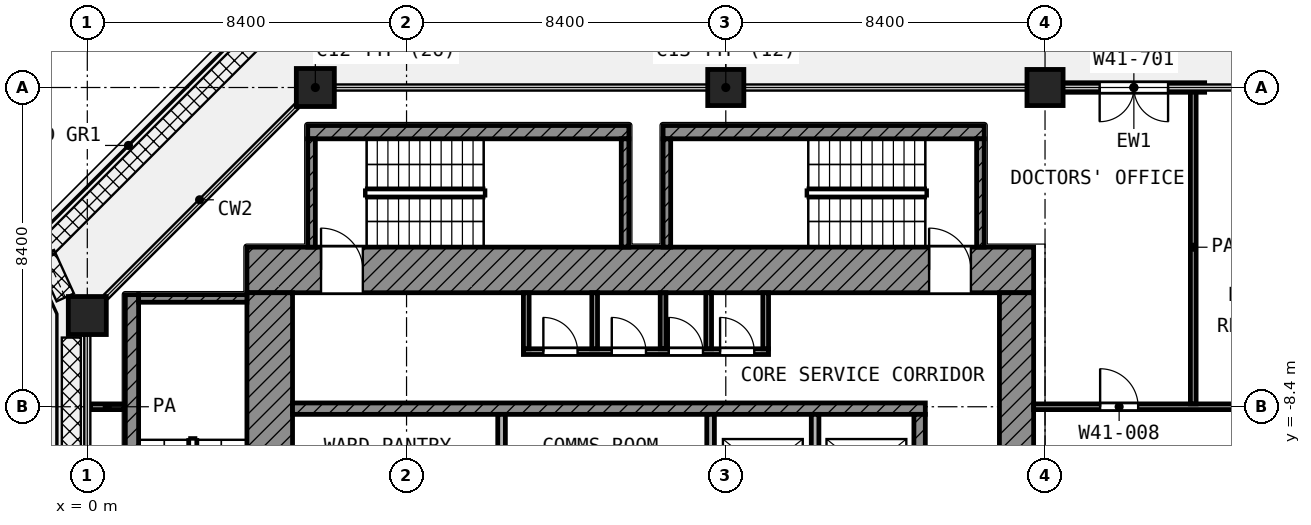
"""IFC4 building model, lengths in metres.
Left out: names, types, materials, properties, quantities, classifications, styles, units other than length and angle.
Written with IfcOpenShell. Run it as: python <this file> out.ifc"""

import sys

from ifc_helpers import new_model, si_unit, direction, frame, frame_2d, origin, origin_2d, place, context, subcontext, project, spatial, rectangle, extrude, element, fill, save


model = new_model("IFC4")
c1 = context("Model", 3, precision=1e-05, world=origin(), true_north=direction((0.0, 1.0)))
c2 = subcontext(c1, "Body", "Model", "MODEL_VIEW")
j1 = project(units=[si_unit("LENGTHUNIT", "METRE"), si_unit("PLANEANGLEUNIT", "RADIAN")], contexts=[c1])
p1 = place(None, origin())
s1 = spatial("IfcSite", under=j1, at=p1, CompositionType="ELEMENT")
p2 = place(p1, origin())
s2 = spatial("IfcBuilding", under=s1, at=p2, CompositionType="ELEMENT")
p3 = place(p2, frame((0.0, 0.0, 200.4)))
s3 = spatial("IfcBuildingStorey", under=s2, at=p3, CompositionType="ELEMENT", Elevation=200.4)
p4 = place(p3, frame((6.0, 0.0, 0.0), z_axis=(0.0, 0.0, 1.0), x_axis=(1.0, 0.0, 0.0)))
e1 = element("IfcColumn", 1, at=p4, inside=s3, PredefinedType="COLUMN", context=c2, shape_type="SweptSolid", body=[
    extrude(rectangle(XDim=1.0, YDim=1.0, at=origin_2d()), origin(), (0.0, 0.0, 1.0), 4.2),
])
for number, where, z_axis, x_axis in (
    (2, (16.8, 0.0, 0.0), (0.0, 0.0, 1.0), (1.0, 0.0, 0.0)),
    (3, (25.2, 0.0, 0.0), (0.0, 0.0, 1.0), (1.0, 0.0, 0.0)),
):
    element("IfcColumn", number, at=place(p3, frame(where, z_axis=z_axis, x_axis=x_axis)), inside=s3, PredefinedType="COLUMN", context=c2, shape_type="SweptSolid", body=[
        extrude(rectangle(XDim=0.95, YDim=0.95, at=origin_2d()), origin(), (0.0, 0.0, 1.0), 4.2),
    ])
p5 = place(p3, frame((0.0, -6.0, 0.0), z_axis=(0.0, 0.0, 1.0), x_axis=(1.0, 0.0, 0.0)))
e4 = element("IfcColumn", 4, at=p5, inside=s3, PredefinedType="COLUMN", context=c2, shape_type="SweptSolid", body=[
    extrude(rectangle(XDim=1.0, YDim=1.0, at=origin_2d()), origin(), (0.0, 0.0, 1.0), 4.2),
])
p6 = place(p3, frame((29.4, 0.0, 0.0), z_axis=(0.0, 0.0, 1.0), x_axis=(-1.0, 0.0, 0.0)))
e5 = element("IfcWall", 5, at=p6, inside=s3, PredefinedType="SOLIDWALL", context=c2, shape_type="SweptSolid", body=[
    extrude(rectangle(XDim=3.725, YDim=0.25, at=frame_2d((1.862, 0.0))), origin(), (0.0, 0.0, 1.0), 2.58),
])
p7 = place(p6, frame((0.962, 0.0, 0.0)))
e6 = element("IfcOpeningElement", 6, at=p7, cuts=e5, PredefinedType="OPENING", context=c2, shape_type="SweptSolid", body=[
    extrude(rectangle(XDim=1.8, YDim=2.1, at=frame_2d((0.9, 1.05))), frame((0.0, 0.135, 0.0), z_axis=(0.0, -1.0, 0.0), x_axis=(1.0, 0.0, 0.0)), (0.0, 0.0, 1.0), 0.27),
])
p8 = place(p3, frame((4.2, -4.8, 0.0), z_axis=(0.0, 0.0, 1.0), x_axis=(1.0, 0.0, 0.0)))
e7 = element("IfcWall", 7, at=p8, inside=s3, PredefinedType="SHEAR", context=c2, shape_type="SweptSolid", body=[
    extrude(rectangle(XDim=20.7, YDim=1.2, at=frame_2d((10.35, 0.0))), origin(), (0.0, 0.0, 1.0), 3.6),
])
p9 = place(p8, frame((1.95, 0.0, 0.0)))
e8 = element("IfcOpeningElement", 8, at=p9, cuts=e7, PredefinedType="OPENING", context=c2, shape_type="SweptSolid", body=[
    extrude(rectangle(XDim=1.1, YDim=2.1, at=frame_2d((0.55, 1.05))), frame((0.0, 0.61, 0.0), z_axis=(0.0, -1.0, 0.0), x_axis=(1.0, 0.0, 0.0)), (0.0, 0.0, 1.0), 1.22),
])
p10 = place(p8, frame((17.95, 0.0, 0.0)))
e9 = element("IfcOpeningElement", 9, at=p10, cuts=e7, PredefinedType="OPENING", context=c2, shape_type="SweptSolid", body=[
    extrude(rectangle(XDim=1.1, YDim=2.1, at=frame_2d((0.55, 1.05))), frame((0.0, 0.61, 0.0), z_axis=(0.0, -1.0, 0.0), x_axis=(1.0, 0.0, 0.0)), (0.0, 0.0, 1.0), 1.22),
])
p11 = place(p3, frame((4.8, -24.9, 0.0), z_axis=(0.0, 0.0, 1.0), x_axis=(0.0, 1.0, 0.0)))
e10 = element("IfcWall", 10, at=p11, inside=s3, PredefinedType="SHEAR", context=c2, shape_type="SweptSolid", body=[
    extrude(rectangle(XDim=19.5, YDim=1.2, at=frame_2d((9.75, 0.0))), origin(), (0.0, 0.0, 1.0), 3.6),
])
p12 = place(p11, frame((11.35, 0.0, 0.0)))
e11 = element("IfcOpeningElement", 11, at=p12, cuts=e10, PredefinedType="OPENING", context=c2, shape_type="SweptSolid", body=[
    extrude(rectangle(XDim=1.1, YDim=2.1, at=frame_2d((0.55, 1.05))), frame((0.0, 0.61, 0.0), z_axis=(0.0, -1.0, 0.0), x_axis=(1.0, 0.0, 0.0)), (0.0, 0.0, 1.0), 1.22),
])
p13 = place(p11, frame((2.05, 0.0, 0.0)))
e12 = element("IfcOpeningElement", 12, at=p13, cuts=e10, PredefinedType="OPENING", context=c2, shape_type="SweptSolid", body=[
    extrude(rectangle(XDim=1.1, YDim=2.1, at=frame_2d((0.55, 1.05))), frame((0.0, 0.61, 0.0), z_axis=(0.0, -1.0, 0.0), x_axis=(1.0, 0.0, 0.0)), (0.0, 0.0, 1.0), 1.22),
])
p14 = place(p3, frame((24.45, -24.0, 0.0), z_axis=(0.0, 0.0, 1.0), x_axis=(0.0, 1.0, 0.0)))
e13 = element("IfcWall", 13, at=p14, inside=s3, PredefinedType="SHEAR", context=c2, shape_type="SweptSolid", body=[
    extrude(rectangle(XDim=18.6, YDim=0.9, at=frame_2d((9.3, 0.0))), origin(), (0.0, 0.0, 1.0), 3.6),
])
p15 = place(p14, frame((10.5, 0.0, 0.0)))
e14 = element("IfcOpeningElement", 14, at=p15, cuts=e13, PredefinedType="OPENING", context=c2, shape_type="SweptSolid", body=[
    extrude(rectangle(XDim=1.8, YDim=2.1, at=frame_2d((0.9, 1.05))), frame((0.0, 0.46, 0.0), z_axis=(0.0, -1.0, 0.0), x_axis=(1.0, 0.0, 0.0)), (0.0, 0.0, 1.0), 0.92),
])
p16 = place(p3, frame((5.4, -8.45, 0.0), z_axis=(0.0, 0.0, 1.0), x_axis=(1.0, 0.0, 0.0)))
e15 = element("IfcWall", 15, at=p16, inside=s3, PredefinedType="SHEAR", context=c2, shape_type="SweptSolid", body=[
    extrude(rectangle(XDim=16.65, YDim=0.3, at=frame_2d((8.325, 0.0))), origin(), (0.0, 0.0, 1.0), 3.6),
])
p17 = place(p3, frame((21.9, -10.95, 0.0), z_axis=(0.0, 0.0, 1.0), x_axis=(0.0, 1.0, 0.0)))
e16 = element("IfcWall", 16, at=p17, inside=s3, PredefinedType="SHEAR", context=c2, shape_type="SweptSolid", body=[
    extrude(rectangle(XDim=2.35, YDim=0.3, at=frame_2d((1.175, 0.0))), origin(), (0.0, 0.0, 1.0), 3.6),
])
for number, where, z_axis, x_axis in (
    (17, (10.9, -10.95, 0.0), (0.0, 0.0, 1.0), (0.0, 1.0, 0.0)),
    (18, (16.4, -10.95, 0.0), (0.0, 0.0, 1.0), (0.0, 1.0, 0.0)),
    (19, (19.15, -10.95, 0.0), (0.0, 0.0, 1.0), (0.0, 1.0, 0.0)),
):
    element("IfcWall", number, at=place(p3, frame(where, z_axis=z_axis, x_axis=x_axis)), inside=s3, PredefinedType="PARTITIONING", context=c2, shape_type="SweptSolid", body=[
        extrude(rectangle(XDim=2.35, YDim=0.2, at=frame_2d((1.175, 0.0))), origin(), (0.0, 0.0, 1.0), 3.6),
    ])
p18 = place(p3, frame((11.475, -6.95, 0.0), z_axis=(0.0, 0.0, 1.0), x_axis=(1.0, 0.0, 0.0)))
e20 = element("IfcWall", 20, at=p18, inside=s3, PredefinedType="PARTITIONING", context=c2, shape_type="SweptSolid", body=[
    extrude(rectangle(XDim=6.45, YDim=0.15, at=frame_2d((3.225, 0.0))), origin(), (0.0, 0.0, 1.0), 3.6),
])
p19 = place(p18, frame((0.525, 0.0, 0.0)))
e21 = element("IfcOpeningElement", 21, at=p19, cuts=e20, PredefinedType="OPENING", context=c2, shape_type="SweptSolid", body=[
    extrude(rectangle(XDim=0.9, YDim=2.1, at=frame_2d((0.45, 1.05))), frame((0.0, 0.085, 0.0), z_axis=(0.0, -1.0, 0.0), x_axis=(1.0, 0.0, 0.0)), (0.0, 0.0, 1.0), 0.17),
])
p20 = place(p18, frame((2.325, 0.0, 0.0)))
e22 = element("IfcOpeningElement", 22, at=p20, cuts=e20, PredefinedType="OPENING", context=c2, shape_type="SweptSolid", body=[
    extrude(rectangle(XDim=0.9, YDim=2.1, at=frame_2d((0.45, 1.05))), frame((0.0, 0.085, 0.0), z_axis=(0.0, -1.0, 0.0), x_axis=(1.0, 0.0, 0.0)), (0.0, 0.0, 1.0), 0.17),
])
p21 = place(p18, frame((3.825, 0.0, 0.0)))
e23 = element("IfcOpeningElement", 23, at=p21, cuts=e20, PredefinedType="OPENING", context=c2, shape_type="SweptSolid", body=[
    extrude(rectangle(XDim=0.9, YDim=2.1, at=frame_2d((0.45, 1.05))), frame((0.0, 0.085, 0.0), z_axis=(0.0, -1.0, 0.0), x_axis=(1.0, 0.0, 0.0)), (0.0, 0.0, 1.0), 0.17),
])
p22 = place(p18, frame((5.175, 0.0, 0.0)))
e24 = element("IfcOpeningElement", 24, at=p22, cuts=e20, PredefinedType="OPENING", context=c2, shape_type="SweptSolid", body=[
    extrude(rectangle(XDim=0.9, YDim=2.1, at=frame_2d((0.45, 1.05))), frame((0.0, 0.085, 0.0), z_axis=(0.0, -1.0, 0.0), x_axis=(1.0, 0.0, 0.0)), (0.0, 0.0, 1.0), 0.17),
])
for number, where, z_axis, x_axis in (
    (25, (11.55, -6.875, 0.0), (0.0, 0.0, 1.0), (0.0, 1.0, 0.0)),
    (26, (13.35, -6.875, 0.0), (0.0, 0.0, 1.0), (0.0, 1.0, 0.0)),
    (27, (15.15, -6.875, 0.0), (0.0, 0.0, 1.0), (0.0, 1.0, 0.0)),
    (28, (16.35, -6.875, 0.0), (0.0, 0.0, 1.0), (0.0, 1.0, 0.0)),
    (29, (17.85, -6.875, 0.0), (0.0, 0.0, 1.0), (0.0, 1.0, 0.0)),
):
    element("IfcWall", number, at=place(p3, frame(where, z_axis=z_axis, x_axis=x_axis)), inside=s3, PredefinedType="PARTITIONING", context=c2, shape_type="SweptSolid", body=[
        extrude(rectangle(XDim=1.475, YDim=0.15, at=frame_2d((0.738, 0.0))), origin(), (0.0, 0.0, 1.0), 3.6),
    ])
p23 = place(p3, frame((1.175, -13.9, 0.0), z_axis=(0.0, 0.0, 1.0), x_axis=(0.0, 1.0, 0.0)))
e30 = element("IfcWall", 30, at=p23, inside=s3, PredefinedType="SHEAR", context=c2, shape_type="SweptSolid", body=[
    extrude(rectangle(XDim=8.45, YDim=0.35, at=frame_2d((4.225, 0.0))), origin(), (0.0, 0.0, 1.0), 3.6),
])
p24 = place(p3, frame((1.35, -5.55, 0.0), z_axis=(0.0, 0.0, 1.0), x_axis=(1.0, 0.0, 0.0)))
e31 = element("IfcWall", 31, at=p24, inside=s3, PredefinedType="SHEAR", context=c2, shape_type="SweptSolid", body=[
    extrude(rectangle(XDim=2.85, YDim=0.2, at=frame_2d((1.425, 0.0))), origin(), (0.0, 0.0, 1.0), 3.6),
])
p25 = place(p3, frame((5.8, -1.175, 0.0), z_axis=(0.0, 0.0, 1.0), x_axis=(1.0, 0.0, 0.0)))
e32 = element("IfcWall", 32, at=p25, inside=s3, PredefinedType="SHEAR", context=c2, shape_type="SweptSolid", body=[
    extrude(rectangle(XDim=8.45, YDim=0.35, at=frame_2d((4.225, 0.0))), origin(), (0.0, 0.0, 1.0), 3.6),
])
for number, where, z_axis, x_axis in (
    (33, (5.9, -4.2, 0.0), (0.0, 0.0, 1.0), (0.0, 1.0, 0.0)),
    (34, (14.15, -4.2, 0.0), (0.0, 0.0, 1.0), (0.0, 1.0, 0.0)),
):
    element("IfcWall", number, at=place(p3, frame(where, z_axis=z_axis, x_axis=x_axis)), inside=s3, PredefinedType="SHEAR", context=c2, shape_type="SweptSolid", body=[
        extrude(rectangle(XDim=2.85, YDim=0.2, at=frame_2d((1.425, 0.0))), origin(), (0.0, 0.0, 1.0), 3.6),
    ])
p26 = place(p3, frame((15.15, -1.175, 0.0), z_axis=(0.0, 0.0, 1.0), x_axis=(1.0, 0.0, 0.0)))
e35 = element("IfcWall", 35, at=p26, inside=s3, PredefinedType="SHEAR", context=c2, shape_type="SweptSolid", body=[
    extrude(rectangle(XDim=8.45, YDim=0.35, at=frame_2d((4.225, 0.0))), origin(), (0.0, 0.0, 1.0), 3.6),
])
for number, where, z_axis, x_axis in (
    (36, (15.25, -4.2, 0.0), (0.0, 0.0, 1.0), (0.0, 1.0, 0.0)),
    (37, (23.5, -4.2, 0.0), (0.0, 0.0, 1.0), (0.0, 1.0, 0.0)),
):
    element("IfcWall", number, at=place(p3, frame(where, z_axis=z_axis, x_axis=x_axis)), inside=s3, PredefinedType="SHEAR", context=c2, shape_type="SweptSolid", body=[
        extrude(rectangle(XDim=2.85, YDim=0.2, at=frame_2d((1.425, 0.0))), origin(), (0.0, 0.0, 1.0), 3.6),
    ])
p27 = place(p3, frame((0.08, -8.4, 0.0), z_axis=(0.0, 0.0, 1.0), x_axis=(1.0, 0.0, 0.0)))
e38 = element("IfcWall", 38, at=p27, inside=s3, PredefinedType="PARTITIONING", context=c2, shape_type="SweptSolid", body=[
    extrude(rectangle(XDim=0.89, YDim=0.15, at=frame_2d((0.445, 0.0))), origin(), (0.0, 0.0, 1.0), 3.6),
])
p28 = place(p3, frame((24.9, -8.4, 0.0), z_axis=(0.0, 0.0, 1.0), x_axis=(1.0, 0.0, 0.0)))
e39 = element("IfcWall", 39, at=p28, inside=s3, PredefinedType="PARTITIONING", context=c2, shape_type="SweptSolid", body=[
    extrude(rectangle(XDim=15.282, YDim=0.15, at=frame_2d((7.641, 0.0))), origin(), (0.0, 0.0, 1.0), 3.6),
])
p29 = place(p28, frame((1.75, 0.0, 0.0)))
e40 = element("IfcOpeningElement", 40, at=p29, cuts=e39, PredefinedType="OPENING", context=c2, shape_type="SweptSolid", body=[
    extrude(rectangle(XDim=1.0, YDim=2.1, at=frame_2d((0.5, 1.05))), frame((0.0, 0.085, 0.0), z_axis=(0.0, -1.0, 0.0), x_axis=(1.0, 0.0, 0.0)), (0.0, 0.0, 1.0), 0.17),
])
p30 = place(p28, frame((5.85, 0.0, 0.0)))
e41 = element("IfcOpeningElement", 41, at=p30, cuts=e39, PredefinedType="OPENING", context=c2, shape_type="SweptSolid", body=[
    extrude(rectangle(XDim=1.2, YDim=2.1, at=frame_2d((0.6, 1.05))), frame((0.0, 0.085, 0.0), z_axis=(0.0, -1.0, 0.0), x_axis=(1.0, 0.0, 0.0)), (0.0, 0.0, 1.0), 0.17),
])
p31 = place(p28, frame((9.3, 0.0, 0.0)))
e42 = element("IfcOpeningElement", 42, at=p31, cuts=e39, PredefinedType="OPENING", context=c2, shape_type="SweptSolid", body=[
    extrude(rectangle(XDim=1.2, YDim=2.1, at=frame_2d((0.6, 1.05))), frame((0.0, 0.085, 0.0), z_axis=(0.0, -1.0, 0.0), x_axis=(1.0, 0.0, 0.0)), (0.0, 0.0, 1.0), 0.17),
])
p32 = place(p3, frame((29.1, -8.325, 0.0), z_axis=(0.0, 0.0, 1.0), x_axis=(0.0, 1.0, 0.0)))
e43 = element("IfcWall", 43, at=p32, inside=s3, PredefinedType="PARTITIONING", context=c2, shape_type="SweptSolid", body=[
    extrude(rectangle(XDim=8.245, YDim=0.15, at=frame_2d((4.123, 0.0))), origin(), (0.0, 0.0, 1.0), 2.7),
])
p33 = place(p7, origin())
e44 = element("IfcDoor", 44, at=p33, inside=s3, OperationType="DOUBLE_DOOR_SINGLE_SWING", PredefinedType="DOOR", context=c2, shape_type="SweptSolid", body=[
    extrude(rectangle(XDim=1.8, YDim=2.1, at=frame_2d((0.9, 1.05))), frame((0.0, 0.025, 0.0), z_axis=(0.0, -1.0, 0.0), x_axis=(1.0, 0.0, 0.0)), (0.0, 0.0, 1.0), 0.05),
])
fill(e6, e44)
p34 = place(p9, origin())
e45 = element("IfcDoor", 45, at=p34, inside=s3, OperationType="SINGLE_SWING_LEFT", PredefinedType="DOOR", context=c2, shape_type="SweptSolid", body=[
    extrude(rectangle(XDim=1.1, YDim=2.1, at=frame_2d((0.55, 1.05))), frame((0.0, 0.025, 0.0), z_axis=(0.0, -1.0, 0.0), x_axis=(1.0, 0.0, 0.0)), (0.0, 0.0, 1.0), 0.05),
])
fill(e8, e45)
p35 = place(p10, origin())
e46 = element("IfcDoor", 46, at=p35, inside=s3, OperationType="SINGLE_SWING_LEFT", PredefinedType="DOOR", context=c2, shape_type="SweptSolid", body=[
    extrude(rectangle(XDim=1.1, YDim=2.1, at=frame_2d((0.55, 1.05))), frame((0.0, 0.025, 0.0), z_axis=(0.0, -1.0, 0.0), x_axis=(1.0, 0.0, 0.0)), (0.0, 0.0, 1.0), 0.05),
])
fill(e9, e46)
p36 = place(p19, origin())
e47 = element("IfcDoor", 47, at=p36, inside=s3, OperationType="SINGLE_SWING_LEFT", PredefinedType="DOOR", context=c2, shape_type="SweptSolid", body=[
    extrude(rectangle(XDim=0.9, YDim=2.1, at=frame_2d((0.45, 1.05))), frame((0.0, 0.025, 0.0), z_axis=(0.0, -1.0, 0.0), x_axis=(1.0, 0.0, 0.0)), (0.0, 0.0, 1.0), 0.05),
])
fill(e21, e47)
p37 = place(p20, origin())
e48 = element("IfcDoor", 48, at=p37, inside=s3, OperationType="SINGLE_SWING_LEFT", PredefinedType="DOOR", context=c2, shape_type="SweptSolid", body=[
    extrude(rectangle(XDim=0.9, YDim=2.1, at=frame_2d((0.45, 1.05))), frame((0.0, 0.025, 0.0), z_axis=(0.0, -1.0, 0.0), x_axis=(1.0, 0.0, 0.0)), (0.0, 0.0, 1.0), 0.05),
])
fill(e22, e48)
p38 = place(p21, origin())
e49 = element("IfcDoor", 49, at=p38, inside=s3, OperationType="SINGLE_SWING_LEFT", PredefinedType="DOOR", context=c2, shape_type="SweptSolid", body=[
    extrude(rectangle(XDim=0.9, YDim=2.1, at=frame_2d((0.45, 1.05))), frame((0.0, 0.025, 0.0), z_axis=(0.0, -1.0, 0.0), x_axis=(1.0, 0.0, 0.0)), (0.0, 0.0, 1.0), 0.05),
])
fill(e23, e49)
p39 = place(p22, origin())
e50 = element("IfcDoor", 50, at=p39, inside=s3, OperationType="SINGLE_SWING_LEFT", PredefinedType="DOOR", context=c2, shape_type="SweptSolid", body=[
    extrude(rectangle(XDim=0.9, YDim=2.1, at=frame_2d((0.45, 1.05))), frame((0.0, 0.025, 0.0), z_axis=(0.0, -1.0, 0.0), x_axis=(1.0, 0.0, 0.0)), (0.0, 0.0, 1.0), 0.05),
])
fill(e24, e50)
p40 = place(p29, origin())
e51 = element("IfcDoor", 51, at=p40, inside=s3, OperationType="SINGLE_SWING_LEFT", PredefinedType="DOOR", context=c2, shape_type="SweptSolid", body=[
    extrude(rectangle(XDim=1.0, YDim=2.1, at=frame_2d((0.5, 1.05))), frame((0.0, 0.025, 0.0), z_axis=(0.0, -1.0, 0.0), x_axis=(1.0, 0.0, 0.0)), (0.0, 0.0, 1.0), 0.05),
])
fill(e40, e51)
save(model, sys.argv[1])
